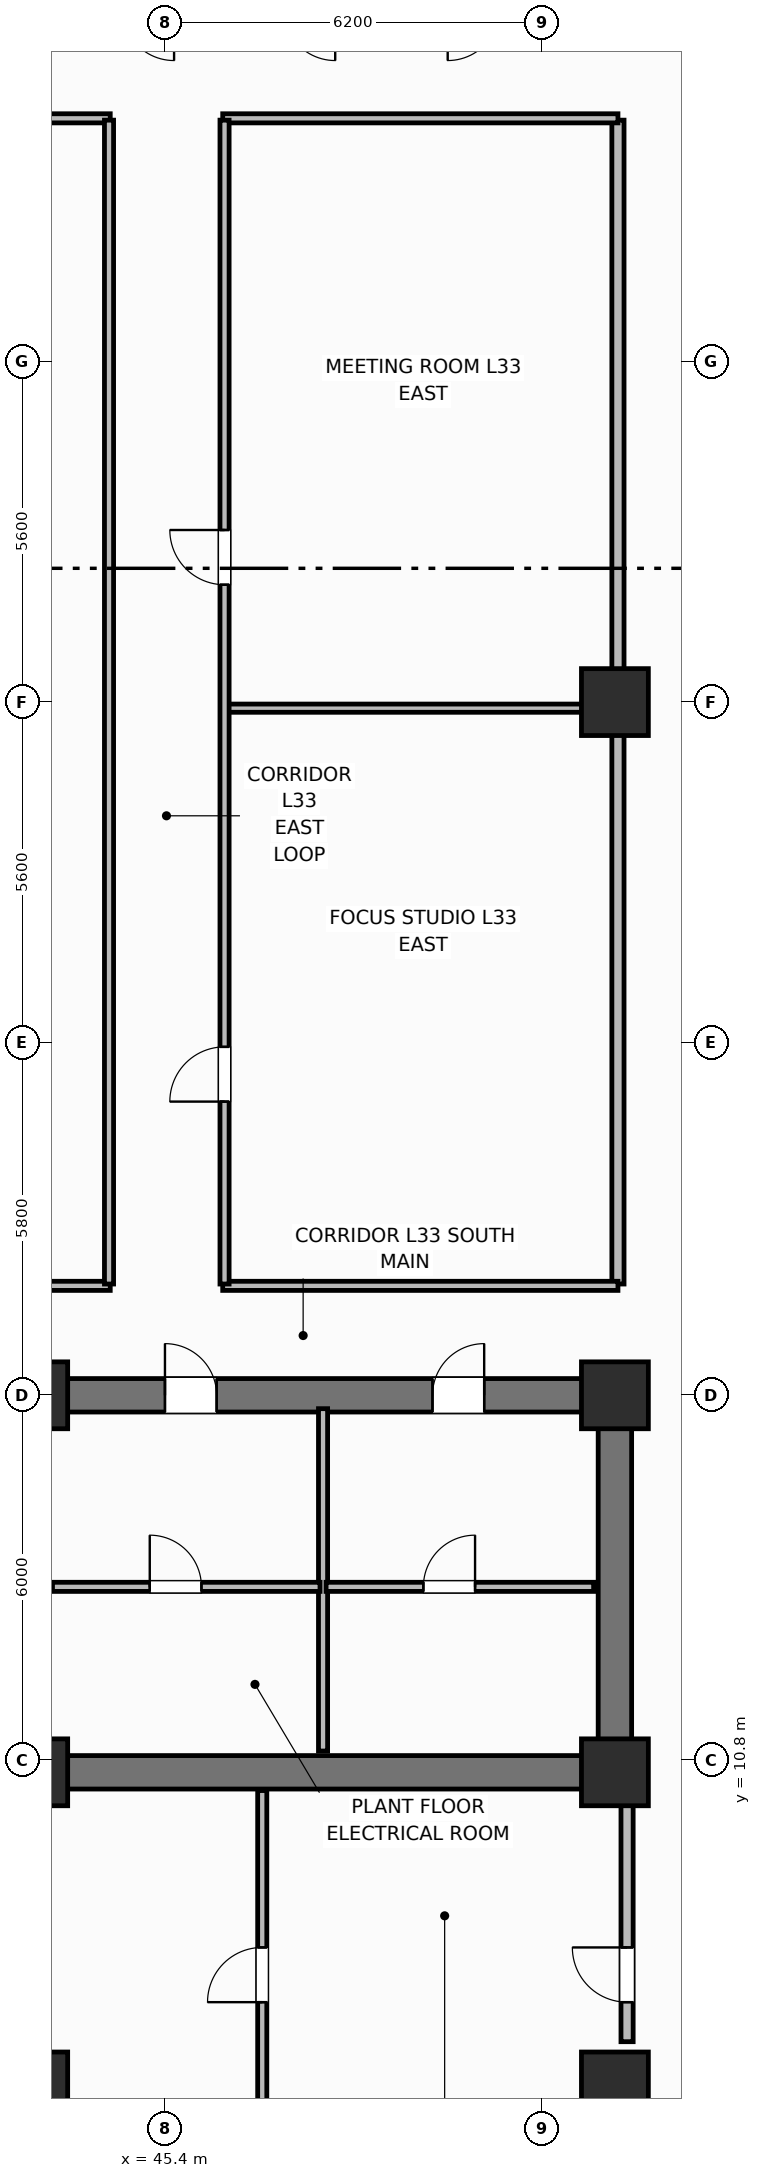
"""IFC4 building model, lengths in metres.
Left out: names, types, materials, properties, quantities, classifications, styles, units other than length and angle.
Written with IfcOpenShell. Run it as: python <this file> out.ifc"""

import sys

from ifc_helpers import new_model, si_unit, direction, frame, frame_2d, origin, origin_2d, place, context, subcontext, project, spatial, rectangle, extrude, element, fill, save


model = new_model("IFC4")
c1 = context("Model", 3, precision=1e-05, world=origin(), true_north=direction((0.0, 1.0)))
c2 = subcontext(c1, "Body", "Model", "MODEL_VIEW")
j1 = project(units=[si_unit("LENGTHUNIT", "METRE"), si_unit("PLANEANGLEUNIT", "RADIAN")], contexts=[c1])
p1 = place(None, origin())
s1 = spatial("IfcSite", under=j1, at=p1, CompositionType="ELEMENT")
p2 = place(p1, origin())
s2 = spatial("IfcBuilding", under=s1, at=p2, CompositionType="ELEMENT")
p3 = place(p2, frame((0.0, 0.0, 132.7)))
s3 = spatial("IfcBuildingStorey", under=s2, at=p3, CompositionType="ELEMENT", Elevation=132.7)
p4 = place(p3, frame((52.8, 10.6, 0.0), z_axis=(0.0, 0.0, 1.0), x_axis=(-1.0, 0.0, 0.0)))
e1 = element("IfcWall", 1, at=p4, inside=s3, PredefinedType="SHEAR", context=c2, shape_type="SweptSolid", body=[
    extrude(rectangle(XDim=27.2, YDim=0.55, at=frame_2d((13.6, 0.0))), origin(), (0.0, 0.0, 1.0), 3.7),
])
p5 = place(p3, frame((52.8, 10.875, 0.0), z_axis=(0.0, 0.0, 1.0), x_axis=(0.0, 1.0, 0.0)))
e2 = element("IfcWall", 2, at=p5, inside=s3, PredefinedType="SHEAR", context=c2, shape_type="SweptSolid", body=[
    extrude(rectangle(XDim=5.65, YDim=0.55, at=frame_2d((2.825, 0.0))), origin(), (0.0, 0.0, 1.0), 3.7),
])
p6 = place(p3, frame((25.6, 16.8, 0.0), z_axis=(0.0, 0.0, 1.0), x_axis=(1.0, 0.0, 0.0)))
e3 = element("IfcWall", 3, at=p6, inside=s3, PredefinedType="SHEAR", context=c2, shape_type="SweptSolid", body=[
    extrude(rectangle(XDim=27.2, YDim=0.55, at=frame_2d((13.6, 0.0))), origin(), (0.0, 0.0, 1.0), 3.7),
])
p7 = place(p6, frame((1.7, 0.0, 0.0)))
e4 = element("IfcOpeningElement", 4, at=p7, cuts=e3, PredefinedType="OPENING", context=c2, shape_type="SweptSolid", body=[
    extrude(rectangle(XDim=1.1, YDim=2.15, at=frame_2d((0.55, 1.075))), frame((0.0, 0.285, 0.0), z_axis=(0.0, -1.0, 0.0), x_axis=(1.0, 0.0, 0.0)), (0.0, 0.0, 1.0), 0.57),
])
p8 = place(p6, frame((4.45, 0.0, 0.0)))
e5 = element("IfcOpeningElement", 5, at=p8, cuts=e3, PredefinedType="OPENING", context=c2, shape_type="SweptSolid", body=[
    extrude(rectangle(XDim=0.85, YDim=2.1, at=frame_2d((0.425, 1.05))), frame((0.0, 0.285, 0.0), z_axis=(0.0, -1.0, 0.0), x_axis=(1.0, 0.0, 0.0)), (0.0, 0.0, 1.0), 0.57),
])
p9 = place(p6, frame((6.5, 0.0, 0.0)))
e6 = element("IfcOpeningElement", 6, at=p9, cuts=e3, PredefinedType="OPENING", context=c2, shape_type="SweptSolid", body=[
    extrude(rectangle(XDim=0.85, YDim=2.1, at=frame_2d((0.425, 1.05))), frame((0.0, 0.285, 0.0), z_axis=(0.0, -1.0, 0.0), x_axis=(1.0, 0.0, 0.0)), (0.0, 0.0, 1.0), 0.57),
])
p10 = place(p6, frame((13.0, 0.0, 0.0)))
e7 = element("IfcOpeningElement", 7, at=p10, cuts=e3, PredefinedType="OPENING", context=c2, shape_type="SweptSolid", body=[
    extrude(rectangle(XDim=1.2, YDim=2.15, at=frame_2d((0.6, 1.075))), frame((0.0, 0.285, 0.0), z_axis=(0.0, -1.0, 0.0), x_axis=(1.0, 0.0, 0.0)), (0.0, 0.0, 1.0), 0.57),
])
p11 = place(p6, frame((19.8, 0.0, 0.0)))
e8 = element("IfcOpeningElement", 8, at=p11, cuts=e3, PredefinedType="OPENING", context=c2, shape_type="SweptSolid", body=[
    extrude(rectangle(XDim=0.85, YDim=2.1, at=frame_2d((0.425, 1.05))), frame((0.0, 0.285, 0.0), z_axis=(0.0, -1.0, 0.0), x_axis=(1.0, 0.0, 0.0)), (0.0, 0.0, 1.0), 0.57),
])
p12 = place(p6, frame((24.2, 0.0, 0.0)))
e9 = element("IfcOpeningElement", 9, at=p12, cuts=e3, PredefinedType="OPENING", context=c2, shape_type="SweptSolid", body=[
    extrude(rectangle(XDim=0.85, YDim=2.1, at=frame_2d((0.425, 1.05))), frame((0.0, 0.285, 0.0), z_axis=(0.0, -1.0, 0.0), x_axis=(1.0, 0.0, 0.0)), (0.0, 0.0, 1.0), 0.57),
])
for number, where, z_axis, x_axis in (
    (10, (43.25, 10.6, 0.0), (0.0, 0.0, 1.0), (1.0, 0.0, 0.0)),
    (11, (43.25, 16.8, 0.0), (0.0, 0.0, 1.0), (1.0, 0.0, 0.0)),
    (12, (52.8, 10.6, 0.0), (0.0, 0.0, 1.0), (1.0, 0.0, 0.0)),
    (13, (52.8, 16.8, 0.0), (0.0, 0.0, 1.0), (1.0, 0.0, 0.0)),
    (14, (52.8, 28.2, 0.0), (0.0, 0.0, 1.0), (1.0, 0.0, 0.0)),
    (15, (43.25, 5.45, 0.0), (0.0, 0.0, 1.0), (1.0, 0.0, 0.0)),
    (16, (52.8, 5.45, 0.0), (0.0, 0.0, 1.0), (1.0, 0.0, 0.0)),
):
    element("IfcColumn", number, at=place(p3, frame(where, z_axis=z_axis, x_axis=x_axis)), inside=s3, PredefinedType="COLUMN", context=c2, shape_type="SweptSolid", body=[
        extrude(rectangle(XDim=1.1, YDim=1.1, at=origin_2d()), origin(), (0.0, 0.0, 1.0), 3.7),
    ])
p13 = place(p3, frame((48.0, 10.95, 0.0), z_axis=(0.0, 0.0, 1.0), x_axis=(0.0, 1.0, 0.0)))
e17 = element("IfcWall", 17, at=p13, inside=s3, PredefinedType="PARTITIONING", context=c2, shape_type="SweptSolid", body=[
    extrude(rectangle(XDim=5.63, YDim=0.15, at=frame_2d((2.815, 0.0))), origin(), (0.0, 0.0, 1.0), 2.49),
])
p14 = place(p3, frame((43.55, 13.65, 0.0), z_axis=(0.0, 0.0, 1.0), x_axis=(1.0, 0.0, 0.0)))
e18 = element("IfcWall", 18, at=p14, inside=s3, PredefinedType="PARTITIONING", context=c2, shape_type="SweptSolid", body=[
    extrude(rectangle(XDim=4.4, YDim=0.15, at=frame_2d((2.2, 0.0))), origin(), (0.0, 0.0, 1.0), 2.49),
])
p15 = place(p14, frame((1.6, 0.0, 0.0)))
e19 = element("IfcOpeningElement", 19, at=p15, cuts=e18, PredefinedType="OPENING", context=c2, shape_type="SweptSolid", body=[
    extrude(rectangle(XDim=0.85, YDim=2.1, at=frame_2d((0.425, 1.05))), frame((0.0, 0.085, 0.0), z_axis=(0.0, -1.0, 0.0), x_axis=(1.0, 0.0, 0.0)), (0.0, 0.0, 1.0), 0.17),
])
p16 = place(p3, frame((48.05, 13.65, 0.0), z_axis=(0.0, 0.0, 1.0), x_axis=(1.0, 0.0, 0.0)))
e20 = element("IfcWall", 20, at=p16, inside=s3, PredefinedType="PARTITIONING", context=c2, shape_type="SweptSolid", body=[
    extrude(rectangle(XDim=4.4, YDim=0.15, at=frame_2d((2.2, 0.0))), origin(), (0.0, 0.0, 1.0), 2.49),
])
p17 = place(p16, frame((1.6, 0.0, 0.0)))
e21 = element("IfcOpeningElement", 21, at=p17, cuts=e20, PredefinedType="OPENING", context=c2, shape_type="SweptSolid", body=[
    extrude(rectangle(XDim=0.85, YDim=2.1, at=frame_2d((0.425, 1.05))), frame((0.0, 0.085, 0.0), z_axis=(0.0, -1.0, 0.0), x_axis=(1.0, 0.0, 0.0)), (0.0, 0.0, 1.0), 0.17),
])
p18 = place(p3, frame((52.85, 18.63, 0.0), z_axis=(0.0, 0.0, 1.0), x_axis=(0.0, 1.0, 0.0)))
e22 = element("IfcWall", 22, at=p18, inside=s3, PredefinedType="PARTITIONING", context=c2, shape_type="SweptSolid", body=[
    extrude(rectangle(XDim=19.14, YDim=0.2, at=frame_2d((9.57, 0.0))), origin(), (0.0, 0.0, 1.0), 2.49),
])
for number, where, z_axis, x_axis in (
    (23, (33.9, 18.6, 0.0), (0.0, 0.0, 1.0), (1.0, 0.0, 0.0)),
    (24, (33.9, 37.8, 0.0), (0.0, 0.0, 1.0), (1.0, 0.0, 0.0)),
):
    element("IfcWall", number, at=place(p3, frame(where, z_axis=z_axis, x_axis=x_axis)), inside=s3, PredefinedType="PARTITIONING", context=c2, shape_type="SweptSolid", body=[
        extrude(rectangle(XDim=10.6, YDim=0.15, at=frame_2d((5.3, 0.0))), origin(), (0.0, 0.0, 1.0), 2.49),
    ])
for number, where, z_axis, x_axis in (
    (25, (46.35, 18.6, 0.0), (0.0, 0.0, 1.0), (1.0, 0.0, 0.0)),
    (26, (46.35, 37.8, 0.0), (0.0, 0.0, 1.0), (1.0, 0.0, 0.0)),
):
    element("IfcWall", number, at=place(p3, frame(where, z_axis=z_axis, x_axis=x_axis)), inside=s3, PredefinedType="PARTITIONING", context=c2, shape_type="SweptSolid", body=[
        extrude(rectangle(XDim=6.5, YDim=0.15, at=frame_2d((3.25, 0.0))), origin(), (0.0, 0.0, 1.0), 2.49),
    ])
p19 = place(p3, frame((46.38, 28.1, 0.0), z_axis=(0.0, 0.0, 1.0), x_axis=(1.0, 0.0, 0.0)))
e27 = element("IfcWall", 27, at=p19, inside=s3, PredefinedType="PARTITIONING", context=c2, shape_type="SweptSolid", body=[
    extrude(rectangle(XDim=6.42, YDim=0.135, at=frame_2d((3.21, 0.0))), origin(), (0.0, 0.0, 1.0), 2.49),
])
p20 = place(p3, frame((44.48, 18.63, 0.0), z_axis=(0.0, 0.0, 1.0), x_axis=(0.0, 1.0, 0.0)))
e28 = element("IfcWall", 28, at=p20, inside=s3, PredefinedType="PARTITIONING", context=c2, shape_type="SweptSolid", body=[
    extrude(rectangle(XDim=19.14, YDim=0.15, at=frame_2d((9.57, 0.0))), origin(), (0.0, 0.0, 1.0), 2.49),
])
p21 = place(p3, frame((46.38, 18.63, 0.0), z_axis=(0.0, 0.0, 1.0), x_axis=(0.0, 1.0, 0.0)))
e29 = element("IfcWall", 29, at=p21, inside=s3, PredefinedType="PARTITIONING", context=c2, shape_type="SweptSolid", body=[
    extrude(rectangle(XDim=19.14, YDim=0.15, at=frame_2d((9.57, 0.0))), origin(), (0.0, 0.0, 1.0), 2.49),
])
p22 = place(p21, frame((3.0, 0.0, 0.0)))
e30 = element("IfcOpeningElement", 30, at=p22, cuts=e29, PredefinedType="OPENING", context=c2, shape_type="SweptSolid", body=[
    extrude(rectangle(XDim=0.9, YDim=2.1, at=frame_2d((0.45, 1.05))), frame((0.0, 0.085, 0.0), z_axis=(0.0, -1.0, 0.0), x_axis=(1.0, 0.0, 0.0)), (0.0, 0.0, 1.0), 0.17),
])
p23 = place(p21, frame((11.5, 0.0, 0.0)))
e31 = element("IfcOpeningElement", 31, at=p23, cuts=e29, PredefinedType="OPENING", context=c2, shape_type="SweptSolid", body=[
    extrude(rectangle(XDim=0.9, YDim=2.1, at=frame_2d((0.45, 1.05))), frame((0.0, 0.085, 0.0), z_axis=(0.0, -1.0, 0.0), x_axis=(1.0, 0.0, 0.0)), (0.0, 0.0, 1.0), 0.17),
])
p24 = place(p3, frame((47.0, 4.97, 0.0), z_axis=(0.0, 0.0, 1.0), x_axis=(0.0, 1.0, 0.0)))
e32 = element("IfcWall", 32, at=p24, inside=s3, PredefinedType="PARTITIONING", context=c2, shape_type="SweptSolid", body=[
    extrude(rectangle(XDim=5.33, YDim=0.15, at=frame_2d((2.665, 0.0))), origin(), (0.0, 0.0, 1.0), 2.49),
])
p25 = place(p24, frame((1.85, 0.0, 0.0)))
e33 = element("IfcOpeningElement", 33, at=p25, cuts=e32, PredefinedType="OPENING", context=c2, shape_type="SweptSolid", body=[
    extrude(rectangle(XDim=0.9, YDim=2.1, at=frame_2d((0.45, 1.05))), frame((0.0, 0.085, 0.0), z_axis=(0.0, -1.0, 0.0), x_axis=(1.0, 0.0, 0.0)), (0.0, 0.0, 1.0), 0.17),
])
p26 = place(p3, frame((53.0, 6.17, 0.0), z_axis=(0.0, 0.0, 1.0), x_axis=(0.0, 1.0, 0.0)))
e34 = element("IfcWall", 34, at=p26, inside=s3, PredefinedType="PARTITIONING", context=c2, shape_type="SweptSolid", body=[
    extrude(rectangle(XDim=4.13, YDim=0.2, at=frame_2d((2.065, 0.0))), origin(), (0.0, 0.0, 1.0), 2.49),
])
p27 = place(p26, frame((0.65, 0.0, 0.0)))
e35 = element("IfcOpeningElement", 35, at=p27, cuts=e34, PredefinedType="OPENING", context=c2, shape_type="SweptSolid", body=[
    extrude(rectangle(XDim=0.9, YDim=2.1, at=frame_2d((0.45, 1.05))), frame((0.0, 0.11, 0.0), z_axis=(0.0, -1.0, 0.0), x_axis=(1.0, 0.0, 0.0)), (0.0, 0.0, 1.0), 0.22),
])
p28 = place(p15, origin())
e36 = element("IfcDoor", 36, at=p28, inside=s3, OperationType="SINGLE_SWING_LEFT", PredefinedType="DOOR", context=c2, shape_type="SweptSolid", body=[
    extrude(rectangle(XDim=0.85, YDim=2.1, at=frame_2d((0.425, 1.05))), frame((0.0, 0.025, 0.0), z_axis=(0.0, -1.0, 0.0), x_axis=(1.0, 0.0, 0.0)), (0.0, 0.0, 1.0), 0.05),
])
fill(e19, e36)
p29 = place(p17, origin())
e37 = element("IfcDoor", 37, at=p29, inside=s3, OperationType="SINGLE_SWING_RIGHT", PredefinedType="DOOR", context=c2, shape_type="SweptSolid", body=[
    extrude(rectangle(XDim=0.85, YDim=2.1, at=frame_2d((0.425, 1.05))), frame((0.0, 0.025, 0.0), z_axis=(0.0, -1.0, 0.0), x_axis=(1.0, 0.0, 0.0)), (0.0, 0.0, 1.0), 0.05),
])
fill(e21, e37)
p30 = place(p22, origin())
e38 = element("IfcDoor", 38, at=p30, inside=s3, OperationType="SINGLE_SWING_LEFT", PredefinedType="DOOR", context=c2, shape_type="SweptSolid", body=[
    extrude(rectangle(XDim=0.9, YDim=2.1, at=frame_2d((0.45, 1.05))), frame((0.0, 0.025, 0.0), z_axis=(0.0, -1.0, 0.0), x_axis=(1.0, 0.0, 0.0)), (0.0, 0.0, 1.0), 0.05),
])
fill(e30, e38)
p31 = place(p23, origin())
e39 = element("IfcDoor", 39, at=p31, inside=s3, OperationType="SINGLE_SWING_RIGHT", PredefinedType="DOOR", context=c2, shape_type="SweptSolid", body=[
    extrude(rectangle(XDim=0.9, YDim=2.1, at=frame_2d((0.45, 1.05))), frame((0.0, 0.025, 0.0), z_axis=(0.0, -1.0, 0.0), x_axis=(1.0, 0.0, 0.0)), (0.0, 0.0, 1.0), 0.05),
])
fill(e31, e39)
p32 = place(p25, origin())
e40 = element("IfcDoor", 40, at=p32, inside=s3, OperationType="SINGLE_SWING_LEFT", PredefinedType="DOOR", context=c2, shape_type="SweptSolid", body=[
    extrude(rectangle(XDim=0.9, YDim=2.1, at=frame_2d((0.45, 1.05))), frame((0.0, 0.025, 0.0), z_axis=(0.0, -1.0, 0.0), x_axis=(1.0, 0.0, 0.0)), (0.0, 0.0, 1.0), 0.05),
])
fill(e33, e40)
p33 = place(p27, origin())
e41 = element("IfcDoor", 41, at=p33, inside=s3, OperationType="SINGLE_SWING_RIGHT", PredefinedType="DOOR", context=c2, shape_type="SweptSolid", body=[
    extrude(rectangle(XDim=0.9, YDim=2.1, at=frame_2d((0.45, 1.05))), frame((0.0, 0.025, 0.0), z_axis=(0.0, -1.0, 0.0), x_axis=(1.0, 0.0, 0.0)), (0.0, 0.0, 1.0), 0.05),
])
fill(e35, e41)
p34 = place(p11, origin())
e42 = element("IfcDoor", 42, at=p34, inside=s3, OperationType="SINGLE_SWING_LEFT", PredefinedType="DOOR", context=c2, shape_type="SweptSolid", body=[
    extrude(rectangle(XDim=0.85, YDim=2.1, at=frame_2d((0.425, 1.05))), frame((0.0, 0.025, 0.0), z_axis=(0.0, -1.0, 0.0), x_axis=(1.0, 0.0, 0.0)), (0.0, 0.0, 1.0), 0.05),
])
fill(e8, e42)
p35 = place(p12, origin())
e43 = element("IfcDoor", 43, at=p35, inside=s3, OperationType="SINGLE_SWING_RIGHT", PredefinedType="DOOR", context=c2, shape_type="SweptSolid", body=[
    extrude(rectangle(XDim=0.85, YDim=2.1, at=frame_2d((0.425, 1.05))), frame((0.0, 0.025, 0.0), z_axis=(0.0, -1.0, 0.0), x_axis=(1.0, 0.0, 0.0)), (0.0, 0.0, 1.0), 0.05),
])
fill(e9, e43)
save(model, sys.argv[1])
